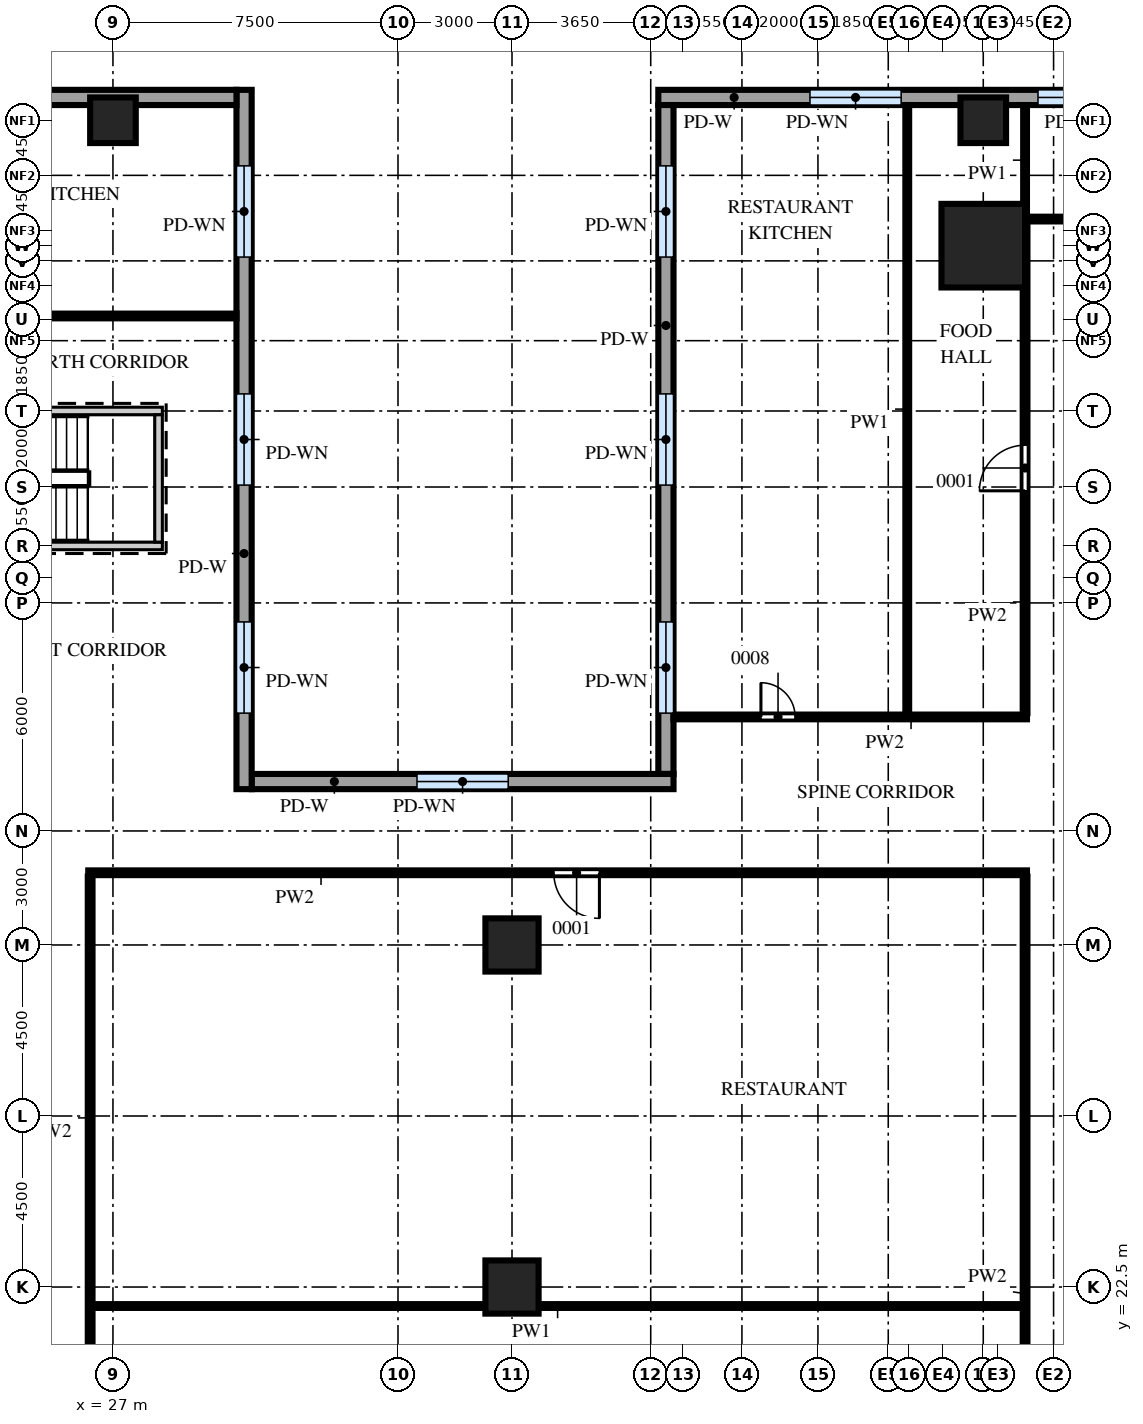
"""IFC4 building model, lengths in metres.
Left out: names, types, materials, properties, quantities, classifications, styles, units other than length and angle.
Written with IfcOpenShell. Run it as: python <this file> out.ifc"""

import sys

from ifc_helpers import new_model, si_unit, direction, frame, frame_2d, origin, origin_2d, place, context, subcontext, project, spatial, rectangle, extrude, source, transform, mapped, element, fill, save


model = new_model("IFC4")
c1 = context("Model", 3, precision=1e-05, world=origin(), true_north=direction((0.0, 1.0)))
c2 = subcontext(c1, "Body", "Model", "MODEL_VIEW")
j1 = project(units=[si_unit("LENGTHUNIT", "METRE"), si_unit("PLANEANGLEUNIT", "RADIAN")], contexts=[c1])
p1 = place(None, origin())
s1 = spatial("IfcSite", under=j1, at=p1, CompositionType="ELEMENT")
p2 = place(p1, origin())
s2 = spatial("IfcBuilding", under=s1, at=p2, CompositionType="ELEMENT")
p3 = place(p2, frame((0.0, 0.0, 18.5)))
s3 = spatial("IfcBuildingStorey", under=s2, at=p3, CompositionType="ELEMENT", Elevation=18.5)
m1 = source(origin(), c2, "Body", "SweptSolid", [
    extrude(rectangle(XDim=7.1, YDim=0.2, at=frame_2d((3.55, 0.0))), origin(), (0.0, 0.0, 1.0), 4.7),
])
p4 = place(p3, frame((21.2, 45.55, 0.0), z_axis=(0.0, 0.0, 1.0), x_axis=(1.0, 0.0, 0.0)))
e1 = element("IfcWall", 1, at=p4, inside=s3, PredefinedType="SHEAR", context=c2, shape_type="MappedRepresentation", body=[
    mapped(m1, transform((0.0, 0.0, 0.0))),
])
m2 = source(origin(), c2, "Body", "SweptSolid", [
    extrude(rectangle(XDim=1.2, YDim=2.1, at=frame_2d((0.6, 1.05))), frame((0.0, 0.11, 0.0), z_axis=(0.0, -1.0, 0.0), x_axis=(1.0, 0.0, 0.0)), (0.0, 0.0, 1.0), 0.22),
])
p5 = place(p4, frame((0.15, 0.0, 0.0)))
e2 = element("IfcOpeningElement", 2, at=p5, cuts=e1, PredefinedType="OPENING", context=c2, shape_type="MappedRepresentation", body=[
    mapped(m2, transform((0.0, 0.0, 0.0))),
])
p6 = place(p3, frame((21.2, 42.0, 0.0), z_axis=(0.0, 0.0, 1.0), x_axis=(1.0, 0.0, 0.0)))
e3 = element("IfcWall", 3, at=p6, inside=s3, PredefinedType="SHEAR", context=c2, shape_type="MappedRepresentation", body=[
    mapped(m1, transform((0.0, 0.0, 0.0))),
])
m3 = source(origin(), c2, "Body", "SweptSolid", [
    extrude(rectangle(XDim=3.35, YDim=0.2, at=frame_2d((1.675, 0.0))), origin(), (0.0, 0.0, 1.0), 4.7),
])
p7 = place(p3, frame((28.2, 42.1, 0.0), z_axis=(0.0, 0.0, 1.0), x_axis=(0.0, 1.0, 0.0)))
e4 = element("IfcWall", 4, at=p7, inside=s3, PredefinedType="SHEAR", context=c2, shape_type="MappedRepresentation", body=[
    mapped(m3, transform((0.0, 0.0, 0.0))),
])
m4 = source(origin(), c2, "Body", "SweptSolid", [
    extrude(rectangle(XDim=2.2, YDim=2.2, at=origin_2d()), origin(), (0.0, 0.0, 1.0), 4.7),
])
p8 = place(p3, frame((49.9, 49.9, 0.0), z_axis=(0.0, 0.0, 1.0), x_axis=(1.0, 0.0, 0.0)))
e5 = element("IfcColumn", 5, at=p8, inside=s3, PredefinedType="COLUMN", context=c2, shape_type="MappedRepresentation", body=[
    mapped(m4, transform((0.0, 0.0, 0.0))),
])
m5 = source(origin(), c2, "Body", "SweptSolid", [
    extrude(rectangle(XDim=1.2, YDim=1.2, at=origin_2d()), origin(), (0.0, 0.0, 1.0), 4.7),
])
for number, where, z_axis, x_axis in (
    (6, (27.0, 53.2, 0.0), (0.0, 0.0, 1.0), (1.0, 0.0, 0.0)),
    (7, (49.9, 53.2, 0.0), (0.0, 0.0, 1.0), (1.0, 0.0, 0.0)),
):
    element("IfcColumn", number, at=place(p3, frame(where, z_axis=z_axis, x_axis=x_axis)), inside=s3, PredefinedType="COLUMN", context=c2, shape_type="MappedRepresentation", body=[
        mapped(m5, transform((0.0, 0.0, 0.0))),
    ])
m6 = source(origin(), c2, "Body", "SweptSolid", [
    extrude(rectangle(XDim=1.4, YDim=1.4, at=origin_2d()), origin(), (0.0, 0.0, 1.0), 4.7),
])
for number, where, z_axis, x_axis in (
    (8, (37.5, 22.5, 0.0), (0.0, 0.0, 1.0), (1.0, 0.0, 0.0)),
    (9, (37.5, 31.5, 0.0), (0.0, 0.0, 1.0), (1.0, 0.0, 0.0)),
):
    element("IfcColumn", number, at=place(p3, frame(where, z_axis=z_axis, x_axis=x_axis)), inside=s3, PredefinedType="COLUMN", context=c2, shape_type="MappedRepresentation", body=[
        mapped(m6, transform((0.0, 0.0, 0.0))),
    ])
m7 = source(origin(), c2, "Body", "SweptSolid", [
    extrude(rectangle(XDim=28.34, YDim=0.4, at=frame_2d((14.17, 0.0))), origin(), (0.0, 0.0, 1.0), 4.7),
])
p9 = place(p3, frame((69.69, 53.8, 0.0), z_axis=(0.0, 0.0, 1.0), x_axis=(-1.0, 0.0, 0.0)))
e10 = element("IfcWall", 10, at=p9, inside=s3, PredefinedType="SOLIDWALL", context=c2, shape_type="MappedRepresentation", body=[
    mapped(m7, transform((0.0, 0.0, 0.0))),
])
m8 = source(origin(), c2, "Body", "SweptSolid", [
    extrude(rectangle(XDim=2.4, YDim=2.4, at=frame_2d((1.2, 1.2))), frame((0.0, 0.21, 0.0), z_axis=(0.0, -1.0, 0.0), x_axis=(1.0, 0.0, 0.0)), (0.0, 0.0, 1.0), 0.42),
])
p10 = place(p9, frame((3.95, 0.0, 1.0)))
e11 = element("IfcOpeningElement", 11, at=p10, cuts=e10, PredefinedType="OPENING", context=c2, shape_type="MappedRepresentation", body=[
    mapped(m8, transform((0.0, 0.0, 0.0))),
])
p11 = place(p9, frame((9.95, 0.0, 1.0)))
e12 = element("IfcOpeningElement", 12, at=p11, cuts=e10, PredefinedType="OPENING", context=c2, shape_type="MappedRepresentation", body=[
    mapped(m8, transform((0.0, 0.0, 0.0))),
])
p12 = place(p9, frame((15.95, 0.0, 1.0)))
e13 = element("IfcOpeningElement", 13, at=p12, cuts=e10, PredefinedType="OPENING", context=c2, shape_type="MappedRepresentation", body=[
    mapped(m8, transform((0.0, 0.0, 0.0))),
])
p13 = place(p9, frame((21.95, 0.0, 1.0)))
e14 = element("IfcOpeningElement", 14, at=p13, cuts=e10, PredefinedType="OPENING", context=c2, shape_type="MappedRepresentation", body=[
    mapped(m8, transform((0.0, 0.0, 0.0))),
])
m9 = source(origin(), c2, "Body", "SweptSolid", [
    extrude(rectangle(XDim=17.6, YDim=0.4, at=frame_2d((8.8, 0.0))), origin(), (0.0, 0.0, 1.0), 4.7),
])
p14 = place(p3, frame((41.55, 53.6, 0.0), z_axis=(0.0, 0.0, 1.0), x_axis=(0.0, -1.0, 0.0)))
e15 = element("IfcWall", 15, at=p14, inside=s3, PredefinedType="SOLIDWALL", context=c2, shape_type="MappedRepresentation", body=[
    mapped(m9, transform((0.0, 0.0, 0.0))),
])
p15 = place(p14, frame((1.6, 0.0, 1.0)))
e16 = element("IfcOpeningElement", 16, at=p15, cuts=e15, PredefinedType="OPENING", context=c2, shape_type="MappedRepresentation", body=[
    mapped(m8, transform((0.0, 0.0, 0.0))),
])
p16 = place(p14, frame((7.6, 0.0, 1.0)))
e17 = element("IfcOpeningElement", 17, at=p16, cuts=e15, PredefinedType="OPENING", context=c2, shape_type="MappedRepresentation", body=[
    mapped(m8, transform((0.0, 0.0, 0.0))),
])
p17 = place(p14, frame((13.6, 0.0, 1.0)))
e18 = element("IfcOpeningElement", 18, at=p17, cuts=e15, PredefinedType="OPENING", context=c2, shape_type="MappedRepresentation", body=[
    mapped(m8, transform((0.0, 0.0, 0.0))),
])
m10 = source(origin(), c2, "Body", "SweptSolid", [
    extrude(rectangle(XDim=11.1, YDim=0.4, at=frame_2d((5.55, 0.0))), origin(), (0.0, 0.0, 1.0), 4.7),
])
p18 = place(p3, frame((41.75, 35.8, 0.0), z_axis=(0.0, 0.0, 1.0), x_axis=(-1.0, 0.0, 0.0)))
e19 = element("IfcWall", 19, at=p18, inside=s3, PredefinedType="SOLIDWALL", context=c2, shape_type="MappedRepresentation", body=[
    mapped(m10, transform((0.0, 0.0, 0.0))),
])
p19 = place(p18, frame((4.35, 0.0, 1.0)))
e20 = element("IfcOpeningElement", 20, at=p19, cuts=e19, PredefinedType="OPENING", context=c2, shape_type="MappedRepresentation", body=[
    mapped(m8, transform((0.0, 0.0, 0.0))),
])
m11 = source(origin(), c2, "Body", "SweptSolid", [
    extrude(rectangle(XDim=18.4, YDim=0.4, at=frame_2d((9.2, 0.0))), origin(), (0.0, 0.0, 1.0), 4.7),
])
p20 = place(p3, frame((30.45, 35.6, 0.0), z_axis=(0.0, 0.0, 1.0), x_axis=(0.0, 1.0, 0.0)))
e21 = element("IfcWall", 21, at=p20, inside=s3, PredefinedType="SOLIDWALL", context=c2, shape_type="MappedRepresentation", body=[
    mapped(m11, transform((0.0, 0.0, 0.0))),
])
p21 = place(p20, frame((2.0, 0.0, 1.0)))
e22 = element("IfcOpeningElement", 22, at=p21, cuts=e21, PredefinedType="OPENING", context=c2, shape_type="MappedRepresentation", body=[
    mapped(m8, transform((0.0, 0.0, 0.0))),
])
p22 = place(p20, frame((8.0, 0.0, 1.0)))
e23 = element("IfcOpeningElement", 23, at=p22, cuts=e21, PredefinedType="OPENING", context=c2, shape_type="MappedRepresentation", body=[
    mapped(m8, transform((0.0, 0.0, 0.0))),
])
p23 = place(p20, frame((14.0, 0.0, 1.0)))
e24 = element("IfcOpeningElement", 24, at=p23, cuts=e21, PredefinedType="OPENING", context=c2, shape_type="MappedRepresentation", body=[
    mapped(m8, transform((0.0, 0.0, 0.0))),
])
m12 = source(origin(), c2, "Body", "SweptSolid", [
    extrude(rectangle(XDim=32.04, YDim=0.4, at=frame_2d((16.02, 0.0))), origin(), (0.0, 0.0, 1.0), 4.7),
])
p24 = place(p3, frame((30.25, 53.8, 0.0), z_axis=(0.0, 0.0, 1.0), x_axis=(-1.0, 0.0, 0.0)))
e25 = element("IfcWall", 25, at=p24, inside=s3, PredefinedType="SOLIDWALL", context=c2, shape_type="MappedRepresentation", body=[
    mapped(m12, transform((0.0, 0.0, 0.0))),
])
p25 = place(p24, frame((14.8, 0.0, 1.0)))
e26 = element("IfcOpeningElement", 26, at=p25, cuts=e25, PredefinedType="OPENING", context=c2, shape_type="MappedRepresentation", body=[
    mapped(m8, transform((0.0, 0.0, 0.0))),
])
p26 = place(p24, frame((20.8, 0.0, 1.0)))
e27 = element("IfcOpeningElement", 27, at=p26, cuts=e25, PredefinedType="OPENING", context=c2, shape_type="MappedRepresentation", body=[
    mapped(m8, transform((0.0, 0.0, 0.0))),
])
m13 = source(origin(), c2, "Body", "SweptSolid", [
    extrude(rectangle(XDim=29.7, YDim=0.125, at=frame_2d((14.85, 0.0))), origin(), (0.0, 0.0, 1.0), 4.7),
])
p27 = place(p3, frame((51.0, 3.6, 0.0), z_axis=(0.0, 0.0, 1.0), x_axis=(0.0, 1.0, 0.0)))
e28 = element("IfcWall", 28, at=p27, inside=s3, PredefinedType="PARTITIONING", context=c2, shape_type="MappedRepresentation", body=[
    mapped(m13, transform((0.0, 0.0, 0.0))),
])
m14 = source(origin(), c2, "Body", "SweptSolid", [
    extrude(rectangle(XDim=1.2, YDim=2.1, at=frame_2d((0.6, 1.05))), frame((0.0, 0.073, 0.0), z_axis=(0.0, -1.0, 0.0), x_axis=(1.0, 0.0, 0.0)), (0.0, 0.0, 1.0), 0.145),
])
p28 = place(p27, frame((6.55, 0.0, 0.0)))
e29 = element("IfcOpeningElement", 29, at=p28, cuts=e28, PredefinedType="OPENING", context=c2, shape_type="MappedRepresentation", body=[
    mapped(m14, transform((0.0, 0.0, 0.0))),
])
m15 = source(origin(), c2, "Body", "SweptSolid", [
    extrude(rectangle(XDim=27.15, YDim=0.125, at=frame_2d((13.575, 0.0))), origin(), (0.0, 0.0, 1.0), 4.7),
])
p29 = place(p3, frame((26.4, 6.15, 0.0), z_axis=(0.0, 0.0, 1.0), x_axis=(0.0, 1.0, 0.0)))
e30 = element("IfcWall", 30, at=p29, inside=s3, PredefinedType="PARTITIONING", context=c2, shape_type="MappedRepresentation", body=[
    mapped(m15, transform((0.0, 0.0, 0.0))),
])
p30 = place(p29, frame((5.4, 0.0, 0.0)))
e31 = element("IfcOpeningElement", 31, at=p30, cuts=e30, PredefinedType="OPENING", context=c2, shape_type="MappedRepresentation", body=[
    mapped(m14, transform((0.0, 0.0, 0.0))),
])
p31 = place(p29, frame((13.25, 0.0, 0.0)))
e32 = element("IfcOpeningElement", 32, at=p31, cuts=e30, PredefinedType="OPENING", context=c2, shape_type="MappedRepresentation", body=[
    mapped(m14, transform((0.0, 0.0, 0.0))),
])
m16 = source(origin(), c2, "Body", "SweptSolid", [
    extrude(rectangle(XDim=24.4, YDim=0.1, at=frame_2d((12.2, 0.0))), origin(), (0.0, 0.0, 1.0), 4.7),
])
p32 = place(p3, frame((26.5, 22.0, 0.0), z_axis=(0.0, 0.0, 1.0), x_axis=(1.0, 0.0, 0.0)))
e33 = element("IfcWall", 33, at=p32, inside=s3, PredefinedType="PARTITIONING", context=c2, shape_type="MappedRepresentation", body=[
    mapped(m16, transform((0.0, 0.0, 0.0))),
])
m17 = source(origin(), c2, "Body", "SweptSolid", [
    extrude(rectangle(XDim=24.7, YDim=0.125, at=frame_2d((12.35, 0.0))), origin(), (0.0, 0.0, 1.0), 4.7),
])
p33 = place(p3, frame((26.35, 33.4, 0.0), z_axis=(0.0, 0.0, 1.0), x_axis=(1.0, 0.0, 0.0)))
e34 = element("IfcWall", 34, at=p33, inside=s3, PredefinedType="PARTITIONING", context=c2, shape_type="MappedRepresentation", body=[
    mapped(m17, transform((0.0, 0.0, 0.0))),
])
p34 = place(p33, frame((12.25, 0.0, 0.0)))
e35 = element("IfcOpeningElement", 35, at=p34, cuts=e34, PredefinedType="OPENING", context=c2, shape_type="MappedRepresentation", body=[
    mapped(m14, transform((0.0, 0.0, 0.0))),
])
m18 = source(origin(), c2, "Body", "SweptSolid", [
    extrude(rectangle(XDim=9.3, YDim=0.125, at=frame_2d((4.65, 0.0))), origin(), (0.0, 0.0, 1.0), 4.7),
])
p35 = place(p3, frame((41.75, 37.5, 0.0), z_axis=(0.0, 0.0, 1.0), x_axis=(1.0, 0.0, 0.0)))
e36 = element("IfcWall", 36, at=p35, inside=s3, PredefinedType="PARTITIONING", context=c2, shape_type="MappedRepresentation", body=[
    mapped(m18, transform((0.0, 0.0, 0.0))),
])
m19 = source(origin(), c2, "Body", "SweptSolid", [
    extrude(rectangle(XDim=0.9, YDim=2.1, at=frame_2d((0.45, 1.05))), frame((0.0, 0.073, 0.0), z_axis=(0.0, -1.0, 0.0), x_axis=(1.0, 0.0, 0.0)), (0.0, 0.0, 1.0), 0.145),
])
p36 = place(p35, frame((2.3, 0.0, 0.0)))
e37 = element("IfcOpeningElement", 37, at=p36, cuts=e36, PredefinedType="OPENING", context=c2, shape_type="MappedRepresentation", body=[
    mapped(m19, transform((0.0, 0.0, 0.0))),
])
m20 = source(origin(), c2, "Body", "SweptSolid", [
    extrude(rectangle(XDim=16.0, YDim=0.1, at=frame_2d((8.0, 0.0))), origin(), (0.0, 0.0, 1.0), 4.7),
])
p37 = place(p3, frame((47.9, 37.6, 0.0), z_axis=(0.0, 0.0, 1.0), x_axis=(0.0, 1.0, 0.0)))
e38 = element("IfcWall", 38, at=p37, inside=s3, PredefinedType="PARTITIONING", context=c2, shape_type="MappedRepresentation", body=[
    mapped(m20, transform((0.0, 0.0, 0.0))),
])
m21 = source(origin(), c2, "Body", "SweptSolid", [
    extrude(rectangle(XDim=12.9, YDim=0.125, at=frame_2d((6.45, 0.0))), origin(), (0.0, 0.0, 1.0), 4.7),
])
p38 = place(p3, frame((51.0, 37.6, 0.0), z_axis=(0.0, 0.0, 1.0), x_axis=(0.0, 1.0, 0.0)))
e39 = element("IfcWall", 39, at=p38, inside=s3, PredefinedType="PARTITIONING", context=c2, shape_type="MappedRepresentation", body=[
    mapped(m21, transform((0.0, 0.0, 0.0))),
])
p39 = place(p38, frame((5.85, 0.0, 0.0)))
e40 = element("IfcOpeningElement", 40, at=p39, cuts=e39, PredefinedType="OPENING", context=c2, shape_type="MappedRepresentation", body=[
    mapped(m14, transform((0.0, 0.0, 0.0))),
])
m22 = source(origin(), c2, "Body", "SweptSolid", [
    extrude(rectangle(XDim=26.1, YDim=0.125, at=frame_2d((13.05, 0.0))), origin(), (0.0, 0.0, 1.0), 4.7),
])
p40 = place(p3, frame((4.15, 48.05, 0.0), z_axis=(0.0, 0.0, 1.0), x_axis=(1.0, 0.0, 0.0)))
e41 = element("IfcWall", 41, at=p40, inside=s3, PredefinedType="PARTITIONING", context=c2, shape_type="MappedRepresentation", body=[
    mapped(m22, transform((0.0, 0.0, 0.0))),
])
m23 = source(origin(), c2, "Body", "SweptSolid", [
    extrude(rectangle(XDim=1.0, YDim=2.1, at=frame_2d((0.5, 1.05))), frame((0.0, 0.073, 0.0), z_axis=(0.0, -1.0, 0.0), x_axis=(1.0, 0.0, 0.0)), (0.0, 0.0, 1.0), 0.145),
])
p41 = place(p40, frame((1.6, 0.0, 0.0)))
e42 = element("IfcOpeningElement", 42, at=p41, cuts=e41, PredefinedType="OPENING", context=c2, shape_type="MappedRepresentation", body=[
    mapped(m23, transform((0.0, 0.0, 0.0))),
])
p42 = place(p40, frame((6.7, 0.0, 0.0)))
e43 = element("IfcOpeningElement", 43, at=p42, cuts=e41, PredefinedType="OPENING", context=c2, shape_type="MappedRepresentation", body=[
    mapped(m19, transform((0.0, 0.0, 0.0))),
])
p43 = place(p40, frame((18.6, 0.0, 0.0)))
e44 = element("IfcOpeningElement", 44, at=p43, cuts=e41, PredefinedType="OPENING", context=c2, shape_type="MappedRepresentation", body=[
    mapped(m19, transform((0.0, 0.0, 0.0))),
])
m24 = source(origin(), c2, "Body", "SweptSolid", [
    extrude(rectangle(XDim=16.1, YDim=0.125, at=frame_2d((8.05, 0.0))), origin(), (0.0, 0.0, 1.0), 4.7),
])
p44 = place(p3, frame((50.95, 50.6, 0.0), z_axis=(0.0, 0.0, 1.0), x_axis=(1.0, 0.0, 0.0)))
e45 = element("IfcWall", 45, at=p44, inside=s3, PredefinedType="PARTITIONING", context=c2, shape_type="MappedRepresentation", body=[
    mapped(m24, transform((0.0, 0.0, 0.0))),
])
p45 = place(p44, frame((7.45, 0.0, 0.0)))
e46 = element("IfcOpeningElement", 46, at=p45, cuts=e45, PredefinedType="OPENING", context=c2, shape_type="MappedRepresentation", body=[
    mapped(m14, transform((0.0, 0.0, 0.0))),
])
m25 = source(origin(), c2, "Body", "SweptSolid", [
    extrude(rectangle(XDim=2.9, YDim=0.1, at=frame_2d((1.45, 0.0))), origin(), (0.0, 0.0, 1.0), 4.7),
])
p46 = place(p3, frame((51.0, 50.7, 0.0), z_axis=(0.0, 0.0, 1.0), x_axis=(0.0, 1.0, 0.0)))
e47 = element("IfcWall", 47, at=p46, inside=s3, PredefinedType="PARTITIONING", context=c2, shape_type="MappedRepresentation", body=[
    mapped(m25, transform((0.0, 0.0, 0.0))),
])
m26 = source(origin(), c2, "Body", "SweptSolid", [
    extrude(rectangle(XDim=2.4, YDim=2.4, at=frame_2d((1.2, 1.2))), frame((0.0, 0.03, 0.0), z_axis=(0.0, -1.0, 0.0), x_axis=(1.0, 0.0, 0.0)), (0.0, 0.0, 1.0), 0.06),
])
p47 = place(p12, origin())
e48 = element("IfcWindow", 48, at=p47, inside=s3, PartitioningType="SINGLE_PANEL", PredefinedType="WINDOW", context=c2, shape_type="MappedRepresentation", body=[
    mapped(m26, transform((0.0, 0.0, 0.0))),
])
fill(e13, e48)
p48 = place(p13, origin())
e49 = element("IfcWindow", 49, at=p48, inside=s3, PartitioningType="SINGLE_PANEL", PredefinedType="WINDOW", context=c2, shape_type="MappedRepresentation", body=[
    mapped(m26, transform((0.0, 0.0, 0.0))),
])
fill(e14, e49)
p49 = place(p15, origin())
e50 = element("IfcWindow", 50, at=p49, inside=s3, PartitioningType="SINGLE_PANEL", PredefinedType="WINDOW", context=c2, shape_type="MappedRepresentation", body=[
    mapped(m26, transform((0.0, 0.0, 0.0))),
])
fill(e16, e50)
p50 = place(p16, origin())
e51 = element("IfcWindow", 51, at=p50, inside=s3, PartitioningType="SINGLE_PANEL", PredefinedType="WINDOW", context=c2, shape_type="MappedRepresentation", body=[
    mapped(m26, transform((0.0, 0.0, 0.0))),
])
fill(e17, e51)
p51 = place(p17, origin())
e52 = element("IfcWindow", 52, at=p51, inside=s3, PartitioningType="SINGLE_PANEL", PredefinedType="WINDOW", context=c2, shape_type="MappedRepresentation", body=[
    mapped(m26, transform((0.0, 0.0, 0.0))),
])
fill(e18, e52)
p52 = place(p19, origin())
e53 = element("IfcWindow", 53, at=p52, inside=s3, PartitioningType="SINGLE_PANEL", PredefinedType="WINDOW", context=c2, shape_type="MappedRepresentation", body=[
    mapped(m26, transform((0.0, 0.0, 0.0))),
])
fill(e20, e53)
p53 = place(p21, origin())
e54 = element("IfcWindow", 54, at=p53, inside=s3, PartitioningType="SINGLE_PANEL", PredefinedType="WINDOW", context=c2, shape_type="MappedRepresentation", body=[
    mapped(m26, transform((0.0, 0.0, 0.0))),
])
fill(e22, e54)
p54 = place(p22, origin())
e55 = element("IfcWindow", 55, at=p54, inside=s3, PartitioningType="SINGLE_PANEL", PredefinedType="WINDOW", context=c2, shape_type="MappedRepresentation", body=[
    mapped(m26, transform((0.0, 0.0, 0.0))),
])
fill(e23, e55)
p55 = place(p23, origin())
e56 = element("IfcWindow", 56, at=p55, inside=s3, PartitioningType="SINGLE_PANEL", PredefinedType="WINDOW", context=c2, shape_type="MappedRepresentation", body=[
    mapped(m26, transform((0.0, 0.0, 0.0))),
])
fill(e24, e56)
m27 = source(origin(), c2, "Body", "SweptSolid", [
    extrude(rectangle(XDim=1.2, YDim=2.1, at=frame_2d((0.6, 1.05))), frame((0.0, 0.025, 0.0), z_axis=(0.0, -1.0, 0.0), x_axis=(1.0, 0.0, 0.0)), (0.0, 0.0, 1.0), 0.05),
])
p56 = place(p34, origin())
e57 = element("IfcDoor", 57, at=p56, inside=s3, OperationType="SINGLE_SWING_RIGHT", PredefinedType="DOOR", context=c2, shape_type="MappedRepresentation", body=[
    mapped(m27, transform((0.0, 0.0, 0.0))),
])
fill(e35, e57)
m28 = source(origin(), c2, "Body", "SweptSolid", [
    extrude(rectangle(XDim=0.9, YDim=2.1, at=frame_2d((0.45, 1.05))), frame((0.0, 0.025, 0.0), z_axis=(0.0, -1.0, 0.0), x_axis=(1.0, 0.0, 0.0)), (0.0, 0.0, 1.0), 0.05),
])
p57 = place(p36, origin())
e58 = element("IfcDoor", 58, at=p57, inside=s3, OperationType="SINGLE_SWING_RIGHT", PredefinedType="DOOR", context=c2, shape_type="MappedRepresentation", body=[
    mapped(m28, transform((0.0, 0.0, 0.0))),
])
fill(e37, e58)
p58 = place(p39, origin())
e59 = element("IfcDoor", 59, at=p58, inside=s3, OperationType="SINGLE_SWING_RIGHT", PredefinedType="DOOR", context=c2, shape_type="MappedRepresentation", body=[
    mapped(m27, transform((0.0, 0.0, 0.0))),
])
fill(e40, e59)
save(model, sys.argv[1])
